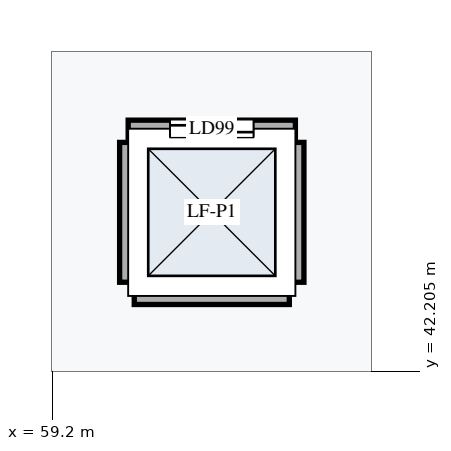
"""IFC4 building model, lengths in metres.
Left out: names, types, materials, properties, quantities, classifications, styles, units other than length and angle.
Written with IfcOpenShell. Run it as: python <this file> out.ifc"""

import sys

from ifc_helpers import new_model, si_unit, direction, frame, frame_2d, origin, place, context, subcontext, project, spatial, rectangle, extrude, element, fill, save


model = new_model("IFC4")
c1 = context("Model", 3, precision=1e-05, world=origin(), true_north=direction((0.0, 1.0)))
c2 = subcontext(c1, "Body", "Model", "MODEL_VIEW")
j1 = project(units=[si_unit("LENGTHUNIT", "METRE"), si_unit("PLANEANGLEUNIT", "RADIAN")], contexts=[c1])
p1 = place(None, origin())
s1 = spatial("IfcSite", under=j1, at=p1, CompositionType="ELEMENT")
p2 = place(p1, origin())
s2 = spatial("IfcBuilding", under=s1, at=p2, CompositionType="ELEMENT")
p3 = place(p2, frame((0.0, 0.0, 4.2)))
s3 = spatial("IfcBuildingStorey", under=s2, at=p3, CompositionType="ELEMENT", Elevation=4.2)
p4 = place(p3, frame((60.2, 45.4, 0.0), z_axis=(0.0, 0.0, 1.0), x_axis=(1.0, 0.0, 0.0)))
e1 = element("IfcWall", 1, at=p4, inside=s3, PredefinedType="STANDARD", context=c2, shape_type="SweptSolid", body=[
    extrude(rectangle(XDim=2.2, YDim=0.225, at=frame_2d((1.1, 0.0))), origin(), (0.0, 0.0, 1.0), 3.96),
])
p5 = place(p4, frame((0.55, 0.0, 0.0)))
e2 = element("IfcOpeningElement", 2, at=p5, cuts=e1, PredefinedType="OPENING", context=c2, shape_type="SweptSolid", body=[
    extrude(rectangle(XDim=1.1, YDim=2.1, at=frame_2d((0.55, 1.05))), frame((0.0, 0.123, 0.0), z_axis=(0.0, -1.0, 0.0), x_axis=(1.0, 0.0, 0.0)), (0.0, 0.0, 1.0), 0.245),
])
p6 = place(p3, frame((60.28, 43.2, 0.0), z_axis=(0.0, 0.0, 1.0), x_axis=(1.0, 0.0, 0.0)))
e3 = element("IfcWall", 3, at=p6, inside=s3, PredefinedType="STANDARD", context=c2, shape_type="SweptSolid", body=[
    extrude(rectangle(XDim=2.04, YDim=0.225, at=frame_2d((1.02, 0.0))), origin(), (0.0, 0.0, 1.0), 3.96),
])
for number, where, z_axis, x_axis in (
    (4, (60.2, 43.38, 0.0), (0.0, 0.0, 1.0), (0.0, 1.0, 0.0)),
    (5, (62.4, 43.38, 0.0), (0.0, 0.0, 1.0), (0.0, 1.0, 0.0)),
):
    element("IfcWall", number, at=place(p3, frame(where, z_axis=z_axis, x_axis=x_axis)), inside=s3, PredefinedType="STANDARD", context=c2, shape_type="SweptSolid", body=[
        extrude(rectangle(XDim=1.84, YDim=0.225, at=frame_2d((0.92, 0.0))), origin(), (0.0, 0.0, 1.0), 3.96),
    ])
p7 = place(p5, origin())
e6 = element("IfcDoor", 6, at=p7, inside=s3, OperationType="DOUBLE_DOOR_SLIDING", PredefinedType="DOOR", context=c2, shape_type="SweptSolid", body=[
    extrude(rectangle(XDim=1.1, YDim=2.1, at=frame_2d((0.55, 1.05))), frame((0.0, 0.025, 0.0), z_axis=(0.0, -1.0, 0.0), x_axis=(1.0, 0.0, 0.0)), (0.0, 0.0, 1.0), 0.05),
])
fill(e2, e6)
save(model, sys.argv[1])
